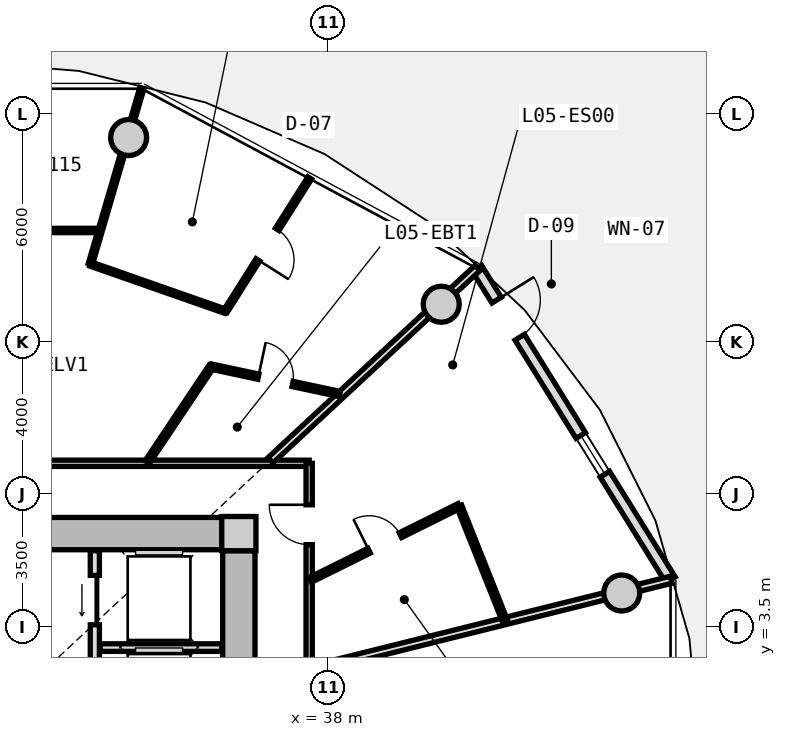
"""IFC4 building model, lengths in metres.
Left out: names, types, materials, properties, quantities, classifications, styles, units other than length and angle.
Written with IfcOpenShell. Run it as: python <this file> out.ifc"""

import sys

from ifc_helpers import new_model, si_unit, direction, frame, frame_2d, origin, origin_2d, place, context, subcontext, project, spatial, rectangle, circle, extrude, source, transform, mapped, element, fill, save


model = new_model("IFC4")
c1 = context("Model", 3, precision=1e-05, world=origin(), true_north=direction((0.0, 1.0)))
c2 = subcontext(c1, "Body", "Model", "MODEL_VIEW")
j1 = project(units=[si_unit("LENGTHUNIT", "METRE"), si_unit("PLANEANGLEUNIT", "RADIAN")], contexts=[c1])
p1 = place(None, origin())
s1 = spatial("IfcSite", under=j1, at=p1, CompositionType="ELEMENT")
p2 = place(p1, origin())
s2 = spatial("IfcBuilding", under=s1, at=p2, CompositionType="ELEMENT")
p3 = place(p2, frame((0.0, 0.0, 21.6)))
s3 = spatial("IfcBuildingStorey", under=s2, at=p3, CompositionType="ELEMENT", Elevation=21.6)
m1 = source(origin(), c2, "Body", "SweptSolid", [
    extrude(rectangle(XDim=0.9, YDim=0.9, at=origin_2d()), origin(), (0.0, 0.0, 1.0), 3.05),
])
p4 = place(p3, frame((35.65, 5.95, 0.0), z_axis=(0.0, 0.0, 1.0), x_axis=(1.0, 0.0, 0.0)))
e1 = element("IfcColumn", 1, at=p4, inside=s3, PredefinedType="COLUMN", context=c2, shape_type="MappedRepresentation", body=[
    mapped(m1, transform((0.0, 0.0, 0.0), x_axis=(1.0, 0.0, 0.0), y_axis=(0.0, 1.0, 0.0), z_axis=(0.0, 0.0, 1.0), scale=1.0)),
])
m2 = source(origin(), c2, "Body", "SweptSolid", [
    extrude(rectangle(XDim=14.4, YDim=0.85, at=frame_2d((7.2, 0.0))), origin(), (0.0, 0.0, 1.0), 2.79),
])
p5 = place(p3, frame((20.8, 5.95, 0.0), z_axis=(0.0, 0.0, 1.0), x_axis=(1.0, 0.0, 0.0)))
e2 = element("IfcWall", 2, at=p5, inside=s3, PredefinedType="SHEAR", context=c2, shape_type="MappedRepresentation", body=[
    mapped(m2, transform((0.0, 0.0, 0.0), x_axis=(1.0, 0.0, 0.0), y_axis=(0.0, 1.0, 0.0), z_axis=(0.0, 0.0, 1.0), scale=1.0)),
])
m3 = source(origin(), c2, "Body", "SweptSolid", [
    extrude(rectangle(XDim=11.0, YDim=0.85, at=frame_2d((5.5, 0.0))), origin(), (0.0, 0.0, 1.0), 2.79),
])
p6 = place(p3, frame((35.65, 5.5, 0.0), z_axis=(0.0, 0.0, 1.0), x_axis=(0.0, -1.0, 0.0)))
e3 = element("IfcWall", 3, at=p6, inside=s3, PredefinedType="SHEAR", context=c2, shape_type="MappedRepresentation", body=[
    mapped(m3, transform((0.0, 0.0, 0.0), x_axis=(1.0, 0.0, 0.0), y_axis=(0.0, 1.0, 0.0), z_axis=(0.0, 0.0, 1.0), scale=1.0)),
])
p7 = place(p6, frame((5.65, 0.0, 0.0)))
e4 = element("IfcOpeningElement", 4, at=p7, cuts=e3, PredefinedType="OPENING", context=c2, shape_type="SweptSolid", body=[
    extrude(rectangle(XDim=1.2, YDim=2.15, at=frame_2d((0.6, 1.075))), frame((0.0, 0.435, 0.0), z_axis=(0.0, -1.0, 0.0), x_axis=(1.0, 0.0, 0.0)), (0.0, 0.0, 1.0), 0.87),
])
p8 = place(p6, frame((9.3, 0.0, 0.0)))
e5 = element("IfcOpeningElement", 5, at=p8, cuts=e3, PredefinedType="OPENING", context=c2, shape_type="SweptSolid", body=[
    extrude(rectangle(XDim=1.0, YDim=2.1, at=frame_2d((0.5, 1.05))), frame((0.0, 0.435, 0.0), z_axis=(0.0, -1.0, 0.0), x_axis=(1.0, 0.0, 0.0)), (0.0, 0.0, 1.0), 0.87),
])
m4 = source(origin(), c2, "Body", "SweptSolid", [
    extrude(circle(Radius=0.475, at=origin_2d()), origin(), (0.0, 0.0, 1.0), 3.47),
])
for number, where, z_axis, x_axis in (
    (6, (45.725, 4.387, -0.42), (0.0, 0.0, 1.0), (1.0, 0.0, 0.0)),
    (7, (40.975, 11.985, -0.42), (0.0, 0.0, 1.0), (1.0, 0.0, 0.0)),
    (8, (32.749, 16.373, -0.42), (0.0, 0.0, 1.0), (1.0, 0.0, 0.0)),
):
    element("IfcColumn", number, at=place(p3, frame(where, z_axis=z_axis, x_axis=x_axis)), inside=s3, PredefinedType="COLUMN", context=c2, shape_type="MappedRepresentation", body=[
        mapped(m4, transform((0.0, 0.0, 0.0), x_axis=(1.0, 0.0, 0.0), y_axis=(0.0, 1.0, 0.0), z_axis=(0.0, 0.0, 1.0), scale=1.0)),
    ])
m5 = source(origin(), c2, "Body", "SweptSolid", [
    extrude(rectangle(XDim=9.649, YDim=0.29, at=frame_2d((4.824, 0.0))), origin(), (0.0, 0.0, 1.0), 2.79),
])
p9 = place(p3, frame((41.916, 12.926, 0.0), z_axis=(0.0, 0.0, 1.0), x_axis=(0.527909458386, -0.849300655684, 0.0)))
e9 = element("IfcWall", 9, at=p9, inside=s3, PredefinedType="SOLIDWALL", context=c2, shape_type="MappedRepresentation", body=[
    mapped(m5, transform((0.0, 0.0, 0.0), x_axis=(1.0, 0.0, 0.0), y_axis=(0.0, 1.0, 0.0), z_axis=(0.0, 0.0, 1.0), scale=1.0)),
])
p10 = place(p9, frame((0.98, 0.0, 0.0)))
e10 = element("IfcOpeningElement", 10, at=p10, cuts=e9, PredefinedType="OPENING", context=c2, shape_type="SweptSolid", body=[
    extrude(rectangle(XDim=1.15, YDim=2.25, at=frame_2d((0.575, 1.125))), frame((0.0, 0.155, 0.0), z_axis=(0.0, -1.0, 0.0), x_axis=(1.0, 0.0, 0.0)), (0.0, 0.0, 1.0), 0.31),
])
p11 = place(p9, frame((5.174, 0.0, 0.85)))
e11 = element("IfcOpeningElement", 11, at=p11, cuts=e9, PredefinedType="OPENING", context=c2, shape_type="SweptSolid", body=[
    extrude(rectangle(XDim=1.2, YDim=1.5, at=frame_2d((0.6, 0.75))), frame((0.0, 0.155, 0.0), z_axis=(0.0, -1.0, 0.0), x_axis=(1.0, 0.0, 0.0)), (0.0, 0.0, 1.0), 0.31),
])
m6 = source(origin(), c2, "Body", "SweptSolid", [
    extrude(rectangle(XDim=5.0, YDim=0.24, at=frame_2d((2.5, 0.0))), origin(), (0.0, 0.0, 1.0), 2.775),
])
p12 = place(p3, frame((31.86, 0.5, 0.0), z_axis=(0.0, 0.0, 1.0), x_axis=(0.0, 1.0, 0.0)))
e12 = element("IfcWall", 12, at=p12, inside=s3, PredefinedType="PARTITIONING", context=c2, shape_type="MappedRepresentation", body=[
    mapped(m6, transform((0.0, 0.0, 0.0), x_axis=(1.0, 0.0, 0.0), y_axis=(0.0, 1.0, 0.0), z_axis=(0.0, 0.0, 1.0), scale=1.0)),
])
p13 = place(p12, frame((3.05, 0.0, 0.0)))
e13 = element("IfcOpeningElement", 13, at=p13, cuts=e12, PredefinedType="OPENING", context=c2, shape_type="SweptSolid", body=[
    extrude(rectangle(XDim=1.3, YDim=2.2, at=frame_2d((0.65, 1.1))), frame((0.0, 0.13, 0.0), z_axis=(0.0, -1.0, 0.0), x_axis=(1.0, 0.0, 0.0)), (0.0, 0.0, 1.0), 0.26),
])
p14 = place(p12, frame((0.55, 0.0, 0.0)))
e14 = element("IfcOpeningElement", 14, at=p14, cuts=e12, PredefinedType="OPENING", context=c2, shape_type="SweptSolid", body=[
    extrude(rectangle(XDim=1.3, YDim=2.2, at=frame_2d((0.65, 1.1))), frame((0.0, 0.13, 0.0), z_axis=(0.0, -1.0, 0.0), x_axis=(1.0, 0.0, 0.0)), (0.0, 0.0, 1.0), 0.26),
])
m7 = source(origin(), c2, "Body", "SweptSolid", [
    extrude(rectangle(XDim=3.2, YDim=0.2, at=frame_2d((1.6, 0.0))), origin(), (0.0, 0.0, 1.0), 2.775),
])
p15 = place(p3, frame((32.0, 2.95, 0.0), z_axis=(0.0, 0.0, 1.0), x_axis=(1.0, 0.0, 0.0)))
e15 = element("IfcWall", 15, at=p15, inside=s3, PredefinedType="PARTITIONING", context=c2, shape_type="MappedRepresentation", body=[
    mapped(m7, transform((0.0, 0.0, 0.0), x_axis=(1.0, 0.0, 0.0), y_axis=(0.0, 1.0, 0.0), z_axis=(0.0, 0.0, 1.0), scale=1.0)),
])
m8 = source(origin(), c2, "Body", "SweptSolid", [
    extrude(rectangle(XDim=19.0, YDim=0.165, at=frame_2d((9.5, 0.0))), origin(), (0.0, 0.0, 1.0), 2.775),
])
p16 = place(p3, frame((18.5, 7.8, 0.0), z_axis=(0.0, 0.0, 1.0), x_axis=(1.0, 0.0, 0.0)))
e16 = element("IfcWall", 16, at=p16, inside=s3, PredefinedType="PARTITIONING", context=c2, shape_type="MappedRepresentation", body=[
    mapped(m8, transform((0.0, 0.0, 0.0), x_axis=(1.0, 0.0, 0.0), y_axis=(0.0, 1.0, 0.0), z_axis=(0.0, 0.0, 1.0), scale=1.0)),
])
p17 = place(p16, frame((10.448, 0.0, 0.0)))
e17 = element("IfcOpeningElement", 17, at=p17, cuts=e16, PredefinedType="OPENING", context=c2, shape_type="SweptSolid", body=[
    extrude(rectangle(XDim=1.05, YDim=2.15, at=frame_2d((0.525, 1.075))), frame((0.0, 0.093, 0.0), z_axis=(0.0, -1.0, 0.0), x_axis=(1.0, 0.0, 0.0)), (0.0, 0.0, 1.0), 0.185),
])
m9 = source(origin(), c2, "Body", "SweptSolid", [
    extrude(rectangle(XDim=15.6, YDim=0.165, at=frame_2d((7.8, 0.0))), origin(), (0.0, 0.0, 1.0), 2.775),
])
p18 = place(p3, frame((37.5, 7.8, 0.0), z_axis=(0.0, 0.0, 1.0), x_axis=(0.0, -1.0, 0.0)))
e18 = element("IfcWall", 18, at=p18, inside=s3, PredefinedType="PARTITIONING", context=c2, shape_type="MappedRepresentation", body=[
    mapped(m9, transform((0.0, 0.0, 0.0), x_axis=(1.0, 0.0, 0.0), y_axis=(0.0, 1.0, 0.0), z_axis=(0.0, 0.0, 1.0), scale=1.0)),
])
p19 = place(p18, frame((12.141, 0.0, 0.0)))
e19 = element("IfcOpeningElement", 19, at=p19, cuts=e18, PredefinedType="OPENING", context=c2, shape_type="SweptSolid", body=[
    extrude(rectangle(XDim=1.25, YDim=2.2, at=frame_2d((0.625, 1.1))), frame((0.0, 0.093, 0.0), z_axis=(0.0, -1.0, 0.0), x_axis=(1.0, 0.0, 0.0)), (0.0, 0.0, 1.0), 0.185),
])
p20 = place(p18, frame((6.196, 0.0, 0.0)))
e20 = element("IfcOpeningElement", 20, at=p20, cuts=e18, PredefinedType="OPENING", context=c2, shape_type="SweptSolid", body=[
    extrude(rectangle(XDim=1.05, YDim=2.15, at=frame_2d((0.525, 1.075))), frame((0.0, 0.093, 0.0), z_axis=(0.0, -1.0, 0.0), x_axis=(1.0, 0.0, 0.0)), (0.0, 0.0, 1.0), 0.185),
])
p21 = place(p18, frame((1.092, 0.0, 0.0)))
e21 = element("IfcOpeningElement", 21, at=p21, cuts=e18, PredefinedType="OPENING", context=c2, shape_type="SweptSolid", body=[
    extrude(rectangle(XDim=1.05, YDim=2.15, at=frame_2d((0.525, 1.075))), frame((0.0, 0.093, 0.0), z_axis=(0.0, -1.0, 0.0), x_axis=(1.0, 0.0, 0.0)), (0.0, 0.0, 1.0), 0.185),
])
m10 = source(origin(), c2, "Body", "SweptSolid", [
    extrude(rectangle(XDim=7.435, YDim=0.19, at=frame_2d((3.717, 0.0))), origin(), (0.0, 0.0, 1.0), 2.225),
])
p22 = place(p3, frame((36.483, 7.88, 0.0), z_axis=(0.0, 0.0, 1.0), x_axis=(0.732651956848, 0.680603489652, 0.0)))
e22 = element("IfcWall", 22, at=p22, inside=s3, PredefinedType="PARTITIONING", context=c2, shape_type="MappedRepresentation", body=[
    mapped(m10, transform((0.0, 0.0, 0.0), x_axis=(1.0, 0.0, 0.0), y_axis=(0.0, 1.0, 0.0), z_axis=(0.0, 0.0, 1.0), scale=1.0)),
])
m11 = source(origin(), c2, "Body", "SweptSolid", [
    extrude(rectangle(XDim=7.993, YDim=0.115, at=frame_2d((3.996, 0.0))), origin(), (0.0, 0.0, 1.0), 2.775),
])
p23 = place(p3, frame((31.996, 13.927, 0.0), z_axis=(0.0, 0.0, 1.0), x_axis=(-1.0, 0.0, 0.0)))
e23 = element("IfcWall", 23, at=p23, inside=s3, PredefinedType="PARTITIONING", context=c2, shape_type="MappedRepresentation", body=[
    mapped(m11, transform((0.0, 0.0, 0.0), x_axis=(1.0, 0.0, 0.0), y_axis=(0.0, 1.0, 0.0), z_axis=(0.0, 0.0, 1.0), scale=1.0)),
])
p24 = place(p23, frame((3.521, 0.0, 0.0)))
e24 = element("IfcOpeningElement", 24, at=p24, cuts=e23, PredefinedType="OPENING", context=c2, shape_type="SweptSolid", body=[
    extrude(rectangle(XDim=0.95, YDim=2.1, at=frame_2d((0.475, 1.05))), frame((0.0, 0.067, 0.0), z_axis=(0.0, -1.0, 0.0), x_axis=(1.0, 0.0, 0.0)), (0.0, 0.0, 1.0), 0.135),
])
m12 = source(origin(), c2, "Body", "SweptSolid", [
    extrude(rectangle(XDim=4.829, YDim=0.115, at=frame_2d((2.415, 0.0))), origin(), (0.0, 0.0, 1.0), 2.225),
])
p25 = place(p3, frame((31.742, 13.042, 0.0), z_axis=(0.0, 0.0, 1.0), x_axis=(0.280838556456, 0.959755023539, 0.0)))
e25 = element("IfcWall", 25, at=p25, inside=s3, PredefinedType="PARTITIONING", context=c2, shape_type="MappedRepresentation", body=[
    mapped(m12, transform((0.0, 0.0, 0.0), x_axis=(1.0, 0.0, 0.0), y_axis=(0.0, 1.0, 0.0), z_axis=(0.0, 0.0, 1.0), scale=1.0)),
])
m13 = source(origin(), c2, "Body", "SweptSolid", [
    extrude(rectangle(XDim=3.025, YDim=0.14, at=frame_2d((1.513, 0.0))), origin(), (0.0, 0.0, 1.0), 2.775),
])
p26 = place(p3, frame((33.24, 7.83, 0.0), z_axis=(0.0, 0.0, 1.0), x_axis=(0.556189165904, 0.831055721195, 0.0)))
e26 = element("IfcWall", 26, at=p26, inside=s3, PredefinedType="PARTITIONING", context=c2, shape_type="MappedRepresentation", body=[
    mapped(m13, transform((0.0, 0.0, 0.0), x_axis=(1.0, 0.0, 0.0), y_axis=(0.0, 1.0, 0.0), z_axis=(0.0, 0.0, 1.0), scale=1.0)),
])
m14 = source(origin(), c2, "Body", "SweptSolid", [
    extrude(rectangle(XDim=3.459, YDim=0.14, at=frame_2d((1.729, 0.0))), origin(), (0.0, 0.0, 1.0), 2.775),
])
p27 = place(p3, frame((34.922, 10.344, 0.0), z_axis=(0.0, 0.0, 1.0), x_axis=(0.978006468578, -0.208574560815, 0.0)))
e27 = element("IfcWall", 27, at=p27, inside=s3, PredefinedType="PARTITIONING", context=c2, shape_type="MappedRepresentation", body=[
    mapped(m14, transform((0.0, 0.0, 0.0), x_axis=(1.0, 0.0, 0.0), y_axis=(0.0, 1.0, 0.0), z_axis=(0.0, 0.0, 1.0), scale=1.0)),
])
p28 = place(p27, frame((1.27, 0.0, 0.0)))
e28 = element("IfcOpeningElement", 28, at=p28, cuts=e27, PredefinedType="OPENING", context=c2, shape_type="SweptSolid", body=[
    extrude(rectangle(XDim=0.92, YDim=2.1, at=frame_2d((0.46, 1.05))), frame((0.0, 0.08, 0.0), z_axis=(0.0, -1.0, 0.0), x_axis=(1.0, 0.0, 0.0)), (0.0, 0.0, 1.0), 0.16),
])
m15 = source(origin(), c2, "Body", "SweptSolid", [
    extrude(rectangle(XDim=4.15, YDim=0.115, at=frame_2d((2.075, 0.0))), origin(), (0.0, 0.0, 1.0), 2.775),
])
p29 = place(p3, frame((35.296, 11.801, 0.0), z_axis=(0.0, 0.0, 1.0), x_axis=(0.534475378192, 0.845184045109, 0.0)))
e29 = element("IfcWall", 29, at=p29, inside=s3, PredefinedType="PARTITIONING", context=c2, shape_type="MappedRepresentation", body=[
    mapped(m15, transform((0.0, 0.0, 0.0), x_axis=(1.0, 0.0, 0.0), y_axis=(0.0, 1.0, 0.0), z_axis=(0.0, 0.0, 1.0), scale=1.0)),
])
p30 = place(p29, frame((1.6, 0.0, 0.0)))
e30 = element("IfcOpeningElement", 30, at=p30, cuts=e29, PredefinedType="OPENING", context=c2, shape_type="SweptSolid", body=[
    extrude(rectangle(XDim=0.95, YDim=2.1, at=frame_2d((0.475, 1.05))), frame((0.0, 0.067, 0.0), z_axis=(0.0, -1.0, 0.0), x_axis=(1.0, 0.0, 0.0)), (0.0, 0.0, 1.0), 0.135),
])
m16 = source(origin(), c2, "Body", "SweptSolid", [
    extrude(rectangle(XDim=3.765, YDim=0.115, at=frame_2d((1.882, 0.0))), origin(), (0.0, 0.0, 1.0), 2.775),
])
p31 = place(p3, frame((35.296, 11.801, 0.0), z_axis=(0.0, 0.0, 1.0), x_axis=(-0.943788572669, 0.330549739222, 0.0)))
e31 = element("IfcWall", 31, at=p31, inside=s3, PredefinedType="PARTITIONING", context=c2, shape_type="MappedRepresentation", body=[
    mapped(m16, transform((0.0, 0.0, 0.0), x_axis=(1.0, 0.0, 0.0), y_axis=(0.0, 1.0, 0.0), z_axis=(0.0, 0.0, 1.0), scale=1.0)),
])
m17 = source(origin(), c2, "Body", "SweptSolid", [
    extrude(rectangle(XDim=9.737, YDim=0.19, at=frame_2d((4.869, 0.0))), origin(), (0.0, 0.0, 1.0), 2.225),
])
p32 = place(p3, frame((37.58, 2.385, 0.0), z_axis=(0.0, 0.0, 1.0), x_axis=(0.970392716238, 0.241532557375, 0.0)))
e32 = element("IfcWall", 32, at=p32, inside=s3, PredefinedType="PARTITIONING", context=c2, shape_type="MappedRepresentation", body=[
    mapped(m17, transform((0.0, 0.0, 0.0), x_axis=(1.0, 0.0, 0.0), y_axis=(0.0, 1.0, 0.0), z_axis=(0.0, 0.0, 1.0), scale=1.0)),
])
m18 = source(origin(), c2, "Body", "SweptSolid", [
    extrude(rectangle(XDim=4.374, YDim=0.14, at=frame_2d((2.187, 0.0))), origin(), (0.0, 0.0, 1.0), 2.775),
])
p33 = place(p3, frame((37.53, 4.732, 0.0), z_axis=(0.0, 0.0, 1.0), x_axis=(0.89568523908, 0.444688601714, 0.0)))
e33 = element("IfcWall", 33, at=p33, inside=s3, PredefinedType="PARTITIONING", context=c2, shape_type="MappedRepresentation", body=[
    mapped(m18, transform((0.0, 0.0, 0.0), x_axis=(1.0, 0.0, 0.0), y_axis=(0.0, 1.0, 0.0), z_axis=(0.0, 0.0, 1.0), scale=1.0)),
])
p34 = place(p33, frame((1.727, 0.0, 0.0)))
e34 = element("IfcOpeningElement", 34, at=p34, cuts=e33, PredefinedType="OPENING", context=c2, shape_type="SweptSolid", body=[
    extrude(rectangle(XDim=0.92, YDim=2.1, at=frame_2d((0.46, 1.05))), frame((0.0, 0.08, 0.0), z_axis=(0.0, -1.0, 0.0), x_axis=(1.0, 0.0, 0.0)), (0.0, 0.0, 1.0), 0.16),
])
m19 = source(origin(), c2, "Body", "SweptSolid", [
    extrude(rectangle(XDim=3.242, YDim=0.14, at=frame_2d((1.621, 0.0))), origin(), (0.0, 0.0, 1.0), 2.775),
])
p35 = place(p3, frame((41.447, 6.677, 0.0), z_axis=(0.0, 0.0, 1.0), x_axis=(0.36984501862, -0.929093462576, 0.0)))
e35 = element("IfcWall", 35, at=p35, inside=s3, PredefinedType="PARTITIONING", context=c2, shape_type="MappedRepresentation", body=[
    mapped(m19, transform((0.0, 0.0, 0.0), x_axis=(1.0, 0.0, 0.0), y_axis=(0.0, 1.0, 0.0), z_axis=(0.0, 0.0, 1.0), scale=1.0)),
])
m20 = source(origin(), c2, "Body", "SweptSolid", [
    extrude(rectangle(XDim=1.15, YDim=2.25, at=frame_2d((0.575, 1.125))), frame((0.0, 0.025, 0.0), z_axis=(0.0, -1.0, 0.0), x_axis=(1.0, 0.0, 0.0)), (0.0, 0.0, 1.0), 0.05),
])
p36 = place(p10, origin())
e36 = element("IfcDoor", 36, at=p36, inside=s3, OperationType="SINGLE_SWING_LEFT", PredefinedType="DOOR", context=c2, shape_type="MappedRepresentation", body=[
    mapped(m20, transform((0.0, 0.0, 0.0), x_axis=(1.0, 0.0, 0.0), y_axis=(0.0, 1.0, 0.0), z_axis=(0.0, 0.0, 1.0), scale=1.0)),
])
fill(e10, e36)
m21 = source(origin(), c2, "Body", "SweptSolid", [
    extrude(rectangle(XDim=1.2, YDim=1.5, at=frame_2d((0.6, 0.75))), frame((0.0, 0.03, 0.0), z_axis=(0.0, -1.0, 0.0), x_axis=(1.0, 0.0, 0.0)), (0.0, 0.0, 1.0), 0.06),
])
p37 = place(p11, origin())
e37 = element("IfcWindow", 37, at=p37, inside=s3, PartitioningType="SINGLE_PANEL", PredefinedType="WINDOW", context=c2, shape_type="MappedRepresentation", body=[
    mapped(m21, transform((0.0, 0.0, 0.0), x_axis=(1.0, 0.0, 0.0), y_axis=(0.0, 1.0, 0.0), z_axis=(0.0, 0.0, 1.0), scale=1.0)),
])
fill(e11, e37)
m22 = source(origin(), c2, "Body", "SweptSolid", [
    extrude(rectangle(XDim=1.3, YDim=2.2, at=frame_2d((0.65, 1.1))), frame((0.0, 0.025, 0.0), z_axis=(0.0, -1.0, 0.0), x_axis=(1.0, 0.0, 0.0)), (0.0, 0.0, 1.0), 0.05),
])
p38 = place(p13, origin())
e38 = element("IfcDoor", 38, at=p38, inside=s3, OperationType="SLIDING_TO_LEFT", PredefinedType="DOOR", context=c2, shape_type="MappedRepresentation", body=[
    mapped(m22, transform((0.0, 0.0, 0.0), x_axis=(1.0, 0.0, 0.0), y_axis=(0.0, 1.0, 0.0), z_axis=(0.0, 0.0, 1.0), scale=1.0)),
])
fill(e13, e38)
m23 = source(origin(), c2, "Body", "SweptSolid", [
    extrude(rectangle(XDim=0.92, YDim=2.1, at=frame_2d((0.46, 1.05))), frame((0.0, 0.025, 0.0), z_axis=(0.0, -1.0, 0.0), x_axis=(1.0, 0.0, 0.0)), (0.0, 0.0, 1.0), 0.05),
])
p39 = place(p28, origin())
e39 = element("IfcDoor", 39, at=p39, inside=s3, OperationType="SINGLE_SWING_LEFT", PredefinedType="DOOR", context=c2, shape_type="MappedRepresentation", body=[
    mapped(m23, transform((0.0, 0.0, 0.0), x_axis=(1.0, 0.0, 0.0), y_axis=(0.0, 1.0, 0.0), z_axis=(0.0, 0.0, 1.0), scale=1.0)),
])
fill(e28, e39)
m24 = source(origin(), c2, "Body", "SweptSolid", [
    extrude(rectangle(XDim=0.95, YDim=2.1, at=frame_2d((0.475, 1.05))), frame((0.0, 0.025, 0.0), z_axis=(0.0, -1.0, 0.0), x_axis=(1.0, 0.0, 0.0)), (0.0, 0.0, 1.0), 0.05),
])
p40 = place(p30, frame((0.95, 0.0, 0.0), z_axis=(0.0, 0.0, 1.0), x_axis=(-1.0, 0.0, 0.0)))
e40 = element("IfcDoor", 40, at=p40, inside=s3, OperationType="SINGLE_SWING_RIGHT", PredefinedType="DOOR", context=c2, shape_type="MappedRepresentation", body=[
    mapped(m24, transform((0.0, 0.0, 0.0), x_axis=(1.0, 0.0, 0.0), y_axis=(0.0, 1.0, 0.0), z_axis=(0.0, 0.0, 1.0), scale=1.0)),
])
fill(e30, e40)
m25 = source(origin(), c2, "Body", "SweptSolid", [
    extrude(rectangle(XDim=1.05, YDim=2.15, at=frame_2d((0.525, 1.075))), frame((0.0, 0.025, 0.0), z_axis=(0.0, -1.0, 0.0), x_axis=(1.0, 0.0, 0.0)), (0.0, 0.0, 1.0), 0.05),
])
p41 = place(p21, frame((1.05, 0.0, 0.0), z_axis=(0.0, 0.0, 1.0), x_axis=(-1.0, 0.0, 0.0)))
e41 = element("IfcDoor", 41, at=p41, inside=s3, OperationType="SINGLE_SWING_RIGHT", PredefinedType="DOOR", context=c2, shape_type="MappedRepresentation", body=[
    mapped(m25, transform((0.0, 0.0, 0.0), x_axis=(1.0, 0.0, 0.0), y_axis=(0.0, 1.0, 0.0), z_axis=(0.0, 0.0, 1.0), scale=1.0)),
])
fill(e21, e41)
p42 = place(p34, origin())
e42 = element("IfcDoor", 42, at=p42, inside=s3, OperationType="SINGLE_SWING_LEFT", PredefinedType="DOOR", context=c2, shape_type="MappedRepresentation", body=[
    mapped(m23, transform((0.0, 0.0, 0.0), x_axis=(1.0, 0.0, 0.0), y_axis=(0.0, 1.0, 0.0), z_axis=(0.0, 0.0, 1.0), scale=1.0)),
])
fill(e34, e42)
save(model, sys.argv[1])
